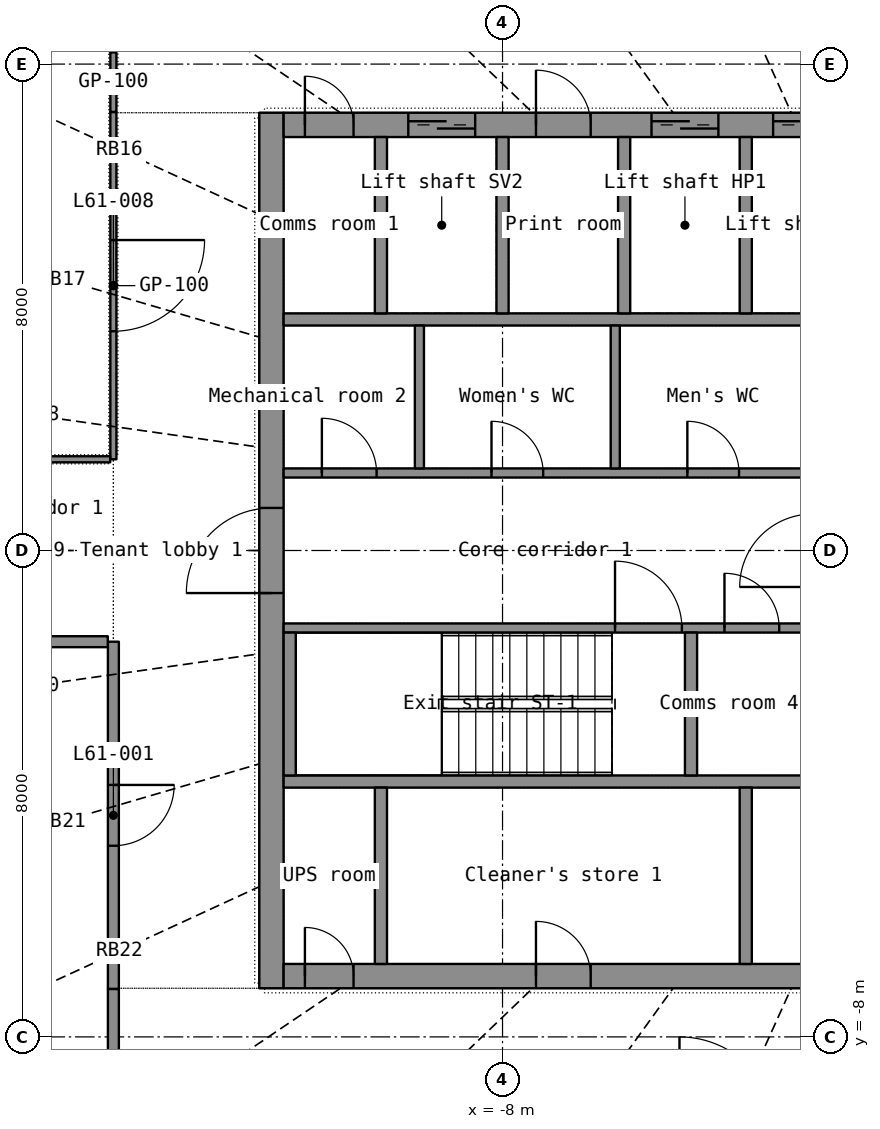
"""IFC4 building model, lengths in metres.
Left out: names, types, materials, properties, quantities, classifications, styles, units other than length and angle.
Written with IfcOpenShell. Run it as: python <this file> out.ifc"""

import sys

from ifc_helpers import new_model, si_unit, direction, frame, frame_2d, origin, place, context, subcontext, project, spatial, rectangle, extrude, element, fill, save


model = new_model("IFC4")
c1 = context("Model", 3, precision=1e-05, world=origin(), true_north=direction((0.0, 1.0)))
c2 = subcontext(c1, "Body", "Model", "MODEL_VIEW")
j1 = project(units=[si_unit("LENGTHUNIT", "METRE"), si_unit("PLANEANGLEUNIT", "RADIAN")], contexts=[c1])
p1 = place(None, origin())
s1 = spatial("IfcSite", under=j1, at=p1, CompositionType="ELEMENT")
p2 = place(p1, origin())
s2 = spatial("IfcBuilding", under=s1, at=p2, CompositionType="ELEMENT")
p3 = place(p2, frame((0.0, 0.0, 250.4)))
s3 = spatial("IfcBuildingStorey", under=s2, at=p3, CompositionType="ELEMENT", Elevation=250.4)
p4 = place(p3, frame((-11.8, -7.2, 0.0), z_axis=(0.0, 0.0, 1.0), x_axis=(0.0, 1.0, 0.0)))
e1 = element("IfcWall", 1, at=p4, inside=s3, PredefinedType="SHEAR", context=c2, shape_type="SweptSolid", body=[
    extrude(rectangle(XDim=14.4, YDim=0.4, at=frame_2d((7.2, 0.0))), origin(), (0.0, 0.0, 1.0), 3.3),
])
p5 = place(p4, frame((6.5, 0.0, 0.0)))
e2 = element("IfcOpeningElement", 2, at=p5, cuts=e1, PredefinedType="OPENING", context=c2, shape_type="SweptSolid", body=[
    extrude(rectangle(XDim=1.4, YDim=2.2, at=frame_2d((0.7, 1.1))), frame((0.0, 0.21, 0.0), z_axis=(0.0, -1.0, 0.0), x_axis=(1.0, 0.0, 0.0)), (0.0, 0.0, 1.0), 0.42),
])
p6 = place(p3, frame((-11.6, -7.0, 0.0), z_axis=(0.0, 0.0, 1.0), x_axis=(1.0, 0.0, 0.0)))
e3 = element("IfcWall", 3, at=p6, inside=s3, PredefinedType="SHEAR", context=c2, shape_type="SweptSolid", body=[
    extrude(rectangle(XDim=23.2, YDim=0.4, at=frame_2d((11.6, 0.0))), origin(), (0.0, 0.0, 1.0), 3.3),
])
p7 = place(p6, frame((20.05, 0.0, 0.0)))
e4 = element("IfcOpeningElement", 4, at=p7, cuts=e3, PredefinedType="OPENING", context=c2, shape_type="SweptSolid", body=[
    extrude(rectangle(XDim=1.1, YDim=2.2, at=frame_2d((0.55, 1.1))), frame((0.0, 0.21, 0.0), z_axis=(0.0, -1.0, 0.0), x_axis=(1.0, 0.0, 0.0)), (0.0, 0.0, 1.0), 0.42),
])
p8 = place(p6, frame((4.15, 0.0, 0.0)))
e5 = element("IfcOpeningElement", 5, at=p8, cuts=e3, PredefinedType="OPENING", context=c2, shape_type="SweptSolid", body=[
    extrude(rectangle(XDim=0.9, YDim=2.1, at=frame_2d((0.45, 1.05))), frame((0.0, 0.21, 0.0), z_axis=(0.0, -1.0, 0.0), x_axis=(1.0, 0.0, 0.0)), (0.0, 0.0, 1.0), 0.42),
])
p9 = place(p6, frame((10.15, 0.0, 0.0)))
e6 = element("IfcOpeningElement", 6, at=p9, cuts=e3, PredefinedType="OPENING", context=c2, shape_type="SweptSolid", body=[
    extrude(rectangle(XDim=0.9, YDim=2.1, at=frame_2d((0.45, 1.05))), frame((0.0, 0.21, 0.0), z_axis=(0.0, -1.0, 0.0), x_axis=(1.0, 0.0, 0.0)), (0.0, 0.0, 1.0), 0.42),
])
p10 = place(p6, frame((16.15, 0.0, 0.0)))
e7 = element("IfcOpeningElement", 7, at=p10, cuts=e3, PredefinedType="OPENING", context=c2, shape_type="SweptSolid", body=[
    extrude(rectangle(XDim=0.9, YDim=2.1, at=frame_2d((0.45, 1.05))), frame((0.0, 0.21, 0.0), z_axis=(0.0, -1.0, 0.0), x_axis=(1.0, 0.0, 0.0)), (0.0, 0.0, 1.0), 0.42),
])
p11 = place(p6, frame((0.35, 0.0, 0.0)))
e8 = element("IfcOpeningElement", 8, at=p11, cuts=e3, PredefinedType="OPENING", context=c2, shape_type="SweptSolid", body=[
    extrude(rectangle(XDim=0.8, YDim=2.05, at=frame_2d((0.4, 1.025))), frame((0.0, 0.21, 0.0), z_axis=(0.0, -1.0, 0.0), x_axis=(1.0, 0.0, 0.0)), (0.0, 0.0, 1.0), 0.42),
])
p12 = place(p6, frame((22.05, 0.0, 0.0)))
e9 = element("IfcOpeningElement", 9, at=p12, cuts=e3, PredefinedType="OPENING", context=c2, shape_type="SweptSolid", body=[
    extrude(rectangle(XDim=0.8, YDim=2.05, at=frame_2d((0.4, 1.025))), frame((0.0, 0.21, 0.0), z_axis=(0.0, -1.0, 0.0), x_axis=(1.0, 0.0, 0.0)), (0.0, 0.0, 1.0), 0.42),
])
p13 = place(p3, frame((-11.6, 7.0, 0.0), z_axis=(0.0, 0.0, 1.0), x_axis=(1.0, 0.0, 0.0)))
e10 = element("IfcWall", 10, at=p13, inside=s3, PredefinedType="SHEAR", context=c2, shape_type="SweptSolid", body=[
    extrude(rectangle(XDim=23.2, YDim=0.4, at=frame_2d((11.6, 0.0))), origin(), (0.0, 0.0, 1.0), 3.3),
])
p14 = place(p13, frame((2.05, 0.0, 0.0)))
e11 = element("IfcOpeningElement", 11, at=p14, cuts=e10, PredefinedType="OPENING", context=c2, shape_type="SweptSolid", body=[
    extrude(rectangle(XDim=1.1, YDim=2.2, at=frame_2d((0.55, 1.1))), frame((0.0, 0.21, 0.0), z_axis=(0.0, -1.0, 0.0), x_axis=(1.0, 0.0, 0.0)), (0.0, 0.0, 1.0), 0.42),
])
p15 = place(p13, frame((6.05, 0.0, 0.0)))
e12 = element("IfcOpeningElement", 12, at=p15, cuts=e10, PredefinedType="OPENING", context=c2, shape_type="SweptSolid", body=[
    extrude(rectangle(XDim=1.1, YDim=2.2, at=frame_2d((0.55, 1.1))), frame((0.0, 0.21, 0.0), z_axis=(0.0, -1.0, 0.0), x_axis=(1.0, 0.0, 0.0)), (0.0, 0.0, 1.0), 0.42),
])
p16 = place(p13, frame((8.05, 0.0, 0.0)))
e13 = element("IfcOpeningElement", 13, at=p16, cuts=e10, PredefinedType="OPENING", context=c2, shape_type="SweptSolid", body=[
    extrude(rectangle(XDim=1.1, YDim=2.2, at=frame_2d((0.55, 1.1))), frame((0.0, 0.21, 0.0), z_axis=(0.0, -1.0, 0.0), x_axis=(1.0, 0.0, 0.0)), (0.0, 0.0, 1.0), 0.42),
])
p17 = place(p13, frame((10.05, 0.0, 0.0)))
e14 = element("IfcOpeningElement", 14, at=p17, cuts=e10, PredefinedType="OPENING", context=c2, shape_type="SweptSolid", body=[
    extrude(rectangle(XDim=1.1, YDim=2.2, at=frame_2d((0.55, 1.1))), frame((0.0, 0.21, 0.0), z_axis=(0.0, -1.0, 0.0), x_axis=(1.0, 0.0, 0.0)), (0.0, 0.0, 1.0), 0.42),
])
p18 = place(p13, frame((12.05, 0.0, 0.0)))
e15 = element("IfcOpeningElement", 15, at=p18, cuts=e10, PredefinedType="OPENING", context=c2, shape_type="SweptSolid", body=[
    extrude(rectangle(XDim=1.1, YDim=2.2, at=frame_2d((0.55, 1.1))), frame((0.0, 0.21, 0.0), z_axis=(0.0, -1.0, 0.0), x_axis=(1.0, 0.0, 0.0)), (0.0, 0.0, 1.0), 0.42),
])
p19 = place(p13, frame((14.05, 0.0, 0.0)))
e16 = element("IfcOpeningElement", 16, at=p19, cuts=e10, PredefinedType="OPENING", context=c2, shape_type="SweptSolid", body=[
    extrude(rectangle(XDim=1.1, YDim=2.2, at=frame_2d((0.55, 1.1))), frame((0.0, 0.21, 0.0), z_axis=(0.0, -1.0, 0.0), x_axis=(1.0, 0.0, 0.0)), (0.0, 0.0, 1.0), 0.42),
])
p20 = place(p13, frame((16.05, 0.0, 0.0)))
e17 = element("IfcOpeningElement", 17, at=p20, cuts=e10, PredefinedType="OPENING", context=c2, shape_type="SweptSolid", body=[
    extrude(rectangle(XDim=1.1, YDim=2.2, at=frame_2d((0.55, 1.1))), frame((0.0, 0.21, 0.0), z_axis=(0.0, -1.0, 0.0), x_axis=(1.0, 0.0, 0.0)), (0.0, 0.0, 1.0), 0.42),
])
p21 = place(p13, frame((18.05, 0.0, 0.0)))
e18 = element("IfcOpeningElement", 18, at=p21, cuts=e10, PredefinedType="OPENING", context=c2, shape_type="SweptSolid", body=[
    extrude(rectangle(XDim=1.1, YDim=2.2, at=frame_2d((0.55, 1.1))), frame((0.0, 0.21, 0.0), z_axis=(0.0, -1.0, 0.0), x_axis=(1.0, 0.0, 0.0)), (0.0, 0.0, 1.0), 0.42),
])
p22 = place(p13, frame((20.05, 0.0, 0.0)))
e19 = element("IfcOpeningElement", 19, at=p22, cuts=e10, PredefinedType="OPENING", context=c2, shape_type="SweptSolid", body=[
    extrude(rectangle(XDim=1.1, YDim=2.2, at=frame_2d((0.55, 1.1))), frame((0.0, 0.21, 0.0), z_axis=(0.0, -1.0, 0.0), x_axis=(1.0, 0.0, 0.0)), (0.0, 0.0, 1.0), 0.42),
])
p23 = place(p13, frame((4.15, 0.0, 0.0)))
e20 = element("IfcOpeningElement", 20, at=p23, cuts=e10, PredefinedType="OPENING", context=c2, shape_type="SweptSolid", body=[
    extrude(rectangle(XDim=0.9, YDim=2.1, at=frame_2d((0.45, 1.05))), frame((0.0, 0.21, 0.0), z_axis=(0.0, -1.0, 0.0), x_axis=(1.0, 0.0, 0.0)), (0.0, 0.0, 1.0), 0.42),
])
p24 = place(p13, frame((0.35, 0.0, 0.0)))
e21 = element("IfcOpeningElement", 21, at=p24, cuts=e10, PredefinedType="OPENING", context=c2, shape_type="SweptSolid", body=[
    extrude(rectangle(XDim=0.8, YDim=2.05, at=frame_2d((0.4, 1.025))), frame((0.0, 0.21, 0.0), z_axis=(0.0, -1.0, 0.0), x_axis=(1.0, 0.0, 0.0)), (0.0, 0.0, 1.0), 0.42),
])
p25 = place(p13, frame((22.05, 0.0, 0.0)))
e22 = element("IfcOpeningElement", 22, at=p25, cuts=e10, PredefinedType="OPENING", context=c2, shape_type="SweptSolid", body=[
    extrude(rectangle(XDim=0.8, YDim=2.05, at=frame_2d((0.4, 1.025))), frame((0.0, 0.21, 0.0), z_axis=(0.0, -1.0, 0.0), x_axis=(1.0, 0.0, 0.0)), (0.0, 0.0, 1.0), 0.42),
])
for number, where, z_axis, x_axis in (
    (23, (-11.6, -3.8, 0.0), (0.0, 0.0, 1.0), (1.0, 0.0, 0.0)),
    (24, (-11.6, 3.8, 0.0), (0.0, 0.0, 1.0), (1.0, 0.0, 0.0)),
):
    element("IfcWall", number, at=place(p3, frame(where, z_axis=z_axis, x_axis=x_axis)), inside=s3, PredefinedType="SHEAR", context=c2, shape_type="SweptSolid", body=[
        extrude(rectangle(XDim=23.2, YDim=0.2, at=frame_2d((11.6, 0.0))), origin(), (0.0, 0.0, 1.0), 3.3),
    ])
p26 = place(p3, frame((-10.0, -6.8, 0.0), z_axis=(0.0, 0.0, 1.0), x_axis=(0.0, 1.0, 0.0)))
e25 = element("IfcWall", 25, at=p26, inside=s3, PredefinedType="SHEAR", context=c2, shape_type="SweptSolid", body=[
    extrude(rectangle(XDim=2.9, YDim=0.2, at=frame_2d((1.45, 0.0))), origin(), (0.0, 0.0, 1.0), 3.3),
])
p27 = place(p3, frame((-4.0, -6.8, 0.0), z_axis=(0.0, 0.0, 1.0), x_axis=(0.0, 1.0, 0.0)))
e26 = element("IfcWall", 26, at=p27, inside=s3, PredefinedType="PARTITIONING", context=c2, shape_type="SweptSolid", body=[
    extrude(rectangle(XDim=2.9, YDim=0.2, at=frame_2d((1.45, 0.0))), origin(), (0.0, 0.0, 1.0), 3.3),
])
for number, where, z_axis, x_axis in (
    (27, (-10.0, 3.9, 0.0), (0.0, 0.0, 1.0), (0.0, 1.0, 0.0)),
    (28, (-8.0, 3.9, 0.0), (0.0, 0.0, 1.0), (0.0, 1.0, 0.0)),
    (29, (-6.0, 3.9, 0.0), (0.0, 0.0, 1.0), (0.0, 1.0, 0.0)),
    (30, (-4.0, 3.9, 0.0), (0.0, 0.0, 1.0), (0.0, 1.0, 0.0)),
):
    element("IfcWall", number, at=place(p3, frame(where, z_axis=z_axis, x_axis=x_axis)), inside=s3, PredefinedType="SHEAR", context=c2, shape_type="SweptSolid", body=[
        extrude(rectangle(XDim=2.9, YDim=0.2, at=frame_2d((1.45, 0.0))), origin(), (0.0, 0.0, 1.0), 3.3),
    ])
p28 = place(p3, frame((-11.6, -1.275, 0.0), z_axis=(0.0, 0.0, 1.0), x_axis=(1.0, 0.0, 0.0)))
e31 = element("IfcWall", 31, at=p28, inside=s3, PredefinedType="SHEAR", context=c2, shape_type="SweptSolid", body=[
    extrude(rectangle(XDim=8.6, YDim=0.15, at=frame_2d((4.3, 0.0))), origin(), (0.0, 0.0, 1.0), 3.3),
])
p29 = place(p28, frame((5.45, 0.0, 0.0)))
e32 = element("IfcOpeningElement", 32, at=p29, cuts=e31, PredefinedType="OPENING", context=c2, shape_type="SweptSolid", body=[
    extrude(rectangle(XDim=1.1, YDim=2.15, at=frame_2d((0.55, 1.075))), frame((0.0, 0.085, 0.0), z_axis=(0.0, -1.0, 0.0), x_axis=(1.0, 0.0, 0.0)), (0.0, 0.0, 1.0), 0.17),
])
p30 = place(p28, frame((7.25, 0.0, 0.0)))
e33 = element("IfcOpeningElement", 33, at=p30, cuts=e31, PredefinedType="OPENING", context=c2, shape_type="SweptSolid", body=[
    extrude(rectangle(XDim=0.9, YDim=2.1, at=frame_2d((0.45, 1.05))), frame((0.0, 0.085, 0.0), z_axis=(0.0, -1.0, 0.0), x_axis=(1.0, 0.0, 0.0)), (0.0, 0.0, 1.0), 0.17),
])
p31 = place(p3, frame((-11.6, 1.275, 0.0), z_axis=(0.0, 0.0, 1.0), x_axis=(1.0, 0.0, 0.0)))
e34 = element("IfcWall", 34, at=p31, inside=s3, PredefinedType="PARTITIONING", context=c2, shape_type="SweptSolid", body=[
    extrude(rectangle(XDim=8.6, YDim=0.15, at=frame_2d((4.3, 0.0))), origin(), (0.0, 0.0, 1.0), 3.3),
])
p32 = place(p31, frame((0.629, 0.0, 0.0)))
e35 = element("IfcOpeningElement", 35, at=p32, cuts=e34, PredefinedType="OPENING", context=c2, shape_type="SweptSolid", body=[
    extrude(rectangle(XDim=0.9, YDim=2.1, at=frame_2d((0.45, 1.05))), frame((0.0, 0.085, 0.0), z_axis=(0.0, -1.0, 0.0), x_axis=(1.0, 0.0, 0.0)), (0.0, 0.0, 1.0), 0.17),
])
p33 = place(p31, frame((3.418, 0.0, 0.0)))
e36 = element("IfcOpeningElement", 36, at=p33, cuts=e34, PredefinedType="OPENING", context=c2, shape_type="SweptSolid", body=[
    extrude(rectangle(XDim=0.85, YDim=2.1, at=frame_2d((0.425, 1.05))), frame((0.0, 0.085, 0.0), z_axis=(0.0, -1.0, 0.0), x_axis=(1.0, 0.0, 0.0)), (0.0, 0.0, 1.0), 0.17),
])
p34 = place(p31, frame((6.639, 0.0, 0.0)))
e37 = element("IfcOpeningElement", 37, at=p34, cuts=e34, PredefinedType="OPENING", context=c2, shape_type="SweptSolid", body=[
    extrude(rectangle(XDim=0.85, YDim=2.1, at=frame_2d((0.425, 1.05))), frame((0.0, 0.085, 0.0), z_axis=(0.0, -1.0, 0.0), x_axis=(1.0, 0.0, 0.0)), (0.0, 0.0, 1.0), 0.17),
])
for number, where, z_axis, x_axis in (
    (38, (-11.5, -3.7, 0.0), (0.0, 0.0, 1.0), (0.0, 1.0, 0.0)),
    (39, (-4.9, -3.7, 0.0), (0.0, 0.0, 1.0), (0.0, 1.0, 0.0)),
):
    element("IfcWall", number, at=place(p3, frame(where, z_axis=z_axis, x_axis=x_axis)), inside=s3, PredefinedType="SHEAR", context=c2, shape_type="SweptSolid", body=[
        extrude(rectangle(XDim=2.35, YDim=0.2, at=frame_2d((1.175, 0.0))), origin(), (0.0, 0.0, 1.0), 3.3),
    ])
for number, where, z_axis, x_axis in (
    (40, (-9.367, 1.35, 0.0), (0.0, 0.0, 1.0), (0.0, 1.0, 0.0)),
    (41, (-6.146, 1.35, 0.0), (0.0, 0.0, 1.0), (0.0, 1.0, 0.0)),
):
    element("IfcWall", number, at=place(p3, frame(where, z_axis=z_axis, x_axis=x_axis)), inside=s3, PredefinedType="PARTITIONING", context=c2, shape_type="SweptSolid", body=[
        extrude(rectangle(XDim=2.35, YDim=0.15, at=frame_2d((1.175, 0.0))), origin(), (0.0, 0.0, 1.0), 3.3),
    ])
p35 = place(p3, frame((-14.4, -1.5, 0.0), z_axis=(0.0, 0.0, 1.0), x_axis=(0.0, -1.0, 0.0)))
e42 = element("IfcWall", 42, at=p35, inside=s3, PredefinedType="PARTITIONING", context=c2, shape_type="SweptSolid", body=[
    extrude(rectangle(XDim=5.712, YDim=0.18, at=frame_2d((2.856, 0.0))), origin(), (0.0, 0.0, 1.0), 2.4),
])
p36 = place(p35, frame((2.356, 0.0, 0.0)))
e43 = element("IfcOpeningElement", 43, at=p36, cuts=e42, PredefinedType="OPENING", context=c2, shape_type="SweptSolid", body=[
    extrude(rectangle(XDim=1.0, YDim=2.1, at=frame_2d((0.5, 1.05))), frame((0.0, 0.1, 0.0), z_axis=(0.0, -1.0, 0.0), x_axis=(1.0, 0.0, 0.0)), (0.0, 0.0, 1.0), 0.2),
])
p37 = place(p3, frame((-14.4, 7.212, 0.0), z_axis=(0.0, 0.0, 1.0), x_axis=(0.0, -1.0, 0.0)))
e44 = element("IfcWall", 44, at=p37, inside=s3, PredefinedType="PARTITIONING", context=c2, shape_type="SweptSolid", body=[
    extrude(rectangle(XDim=5.712, YDim=0.1, at=frame_2d((2.856, 0.0))), origin(), (0.0, 0.0, 1.0), 2.4),
])
p38 = place(p37, frame((2.106, 0.0, 0.0)))
e45 = element("IfcOpeningElement", 45, at=p38, cuts=e44, PredefinedType="OPENING", context=c2, shape_type="SweptSolid", body=[
    extrude(rectangle(XDim=1.5, YDim=2.4, at=frame_2d((0.75, 1.2))), frame((0.0, 0.06, 0.0), z_axis=(0.0, -1.0, 0.0), x_axis=(1.0, 0.0, 0.0)), (0.0, 0.0, 1.0), 0.12),
])
p39 = place(p3, frame((-17.948, -1.5, 0.0), z_axis=(0.0, 0.0, 1.0), x_axis=(1.0, 0.0, 0.0)))
e46 = element("IfcWall", 46, at=p39, inside=s3, PredefinedType="PARTITIONING", context=c2, shape_type="SweptSolid", body=[
    extrude(rectangle(XDim=3.456, YDim=0.18, at=frame_2d((1.728, 0.0))), origin(), (0.0, 0.0, 1.0), 2.4),
])
p40 = place(p3, frame((-14.452, 1.5, 0.0), z_axis=(0.0, 0.0, 1.0), x_axis=(-1.0, 0.0, 0.0)))
e47 = element("IfcWall", 47, at=p40, inside=s3, PredefinedType="PARTITIONING", context=c2, shape_type="SweptSolid", body=[
    extrude(rectangle(XDim=3.496, YDim=0.1, at=frame_2d((1.748, 0.0))), origin(), (0.0, 0.0, 1.0), 2.4),
])
p41 = place(p3, frame((-16.838, 9.657, 0.0), z_axis=(0.0, 0.0, 1.0), x_axis=(0.86742946, -0.497560179, 0.0)))
e48 = element("IfcWall", 48, at=p41, inside=s3, PredefinedType="PARTITIONING", context=c2, shape_type="SweptSolid", body=[
    extrude(rectangle(XDim=2.811, YDim=0.15, at=frame_2d((1.405, 0.0))), origin(), (0.0, 0.0, 1.0), 2.4),
])
p42 = place(p3, frame((-14.4, -7.213, 0.0), z_axis=(0.0, 0.0, 1.0), x_axis=(0.0, -1.0, 0.0)))
e49 = element("IfcWall", 49, at=p42, inside=s3, PredefinedType="PARTITIONING", context=c2, shape_type="SweptSolid", body=[
    extrude(rectangle(XDim=2.295, YDim=0.18, at=frame_2d((1.147, 0.0))), origin(), (0.0, 0.0, 1.0), 2.4),
])
p43 = place(p3, frame((-14.4, 8.192, 0.0), z_axis=(0.0, 0.0, 1.0), x_axis=(0.0, -1.0, 0.0)))
e50 = element("IfcWall", 50, at=p43, inside=s3, PredefinedType="PARTITIONING", context=c2, shape_type="SweptSolid", body=[
    extrude(rectangle(XDim=0.979, YDim=0.1, at=frame_2d((0.49, 0.0))), origin(), (0.0, 0.0, 1.0), 2.4),
])
p44 = place(p8, origin())
e51 = element("IfcDoor", 51, at=p44, inside=s3, OperationType="SINGLE_SWING_LEFT", PredefinedType="DOOR", context=c2, shape_type="SweptSolid", body=[
    extrude(rectangle(XDim=0.9, YDim=2.1, at=frame_2d((0.45, 1.05))), frame((0.0, 0.025, 0.0), z_axis=(0.0, -1.0, 0.0), x_axis=(1.0, 0.0, 0.0)), (0.0, 0.0, 1.0), 0.05),
])
fill(e5, e51)
p45 = place(p11, origin())
e52 = element("IfcDoor", 52, at=p45, inside=s3, OperationType="SINGLE_SWING_LEFT", PredefinedType="DOOR", context=c2, shape_type="SweptSolid", body=[
    extrude(rectangle(XDim=0.8, YDim=2.05, at=frame_2d((0.4, 1.025))), frame((0.0, 0.025, 0.0), z_axis=(0.0, -1.0, 0.0), x_axis=(1.0, 0.0, 0.0)), (0.0, 0.0, 1.0), 0.05),
])
fill(e8, e52)
p46 = place(p14, origin())
e53 = element("IfcDoor", 53, at=p46, inside=s3, OperationType="DOUBLE_DOOR_SLIDING", PredefinedType="DOOR", context=c2, shape_type="SweptSolid", body=[
    extrude(rectangle(XDim=1.1, YDim=2.2, at=frame_2d((0.55, 1.1))), frame((0.0, 0.025, 0.0), z_axis=(0.0, -1.0, 0.0), x_axis=(1.0, 0.0, 0.0)), (0.0, 0.0, 1.0), 0.05),
])
fill(e11, e53)
p47 = place(p15, origin())
e54 = element("IfcDoor", 54, at=p47, inside=s3, OperationType="DOUBLE_DOOR_SLIDING", PredefinedType="DOOR", context=c2, shape_type="SweptSolid", body=[
    extrude(rectangle(XDim=1.1, YDim=2.2, at=frame_2d((0.55, 1.1))), frame((0.0, 0.025, 0.0), z_axis=(0.0, -1.0, 0.0), x_axis=(1.0, 0.0, 0.0)), (0.0, 0.0, 1.0), 0.05),
])
fill(e12, e54)
p48 = place(p16, origin())
e55 = element("IfcDoor", 55, at=p48, inside=s3, OperationType="DOUBLE_DOOR_SLIDING", PredefinedType="DOOR", context=c2, shape_type="SweptSolid", body=[
    extrude(rectangle(XDim=1.1, YDim=2.2, at=frame_2d((0.55, 1.1))), frame((0.0, 0.025, 0.0), z_axis=(0.0, -1.0, 0.0), x_axis=(1.0, 0.0, 0.0)), (0.0, 0.0, 1.0), 0.05),
])
fill(e13, e55)
p49 = place(p23, origin())
e56 = element("IfcDoor", 56, at=p49, inside=s3, OperationType="SINGLE_SWING_LEFT", PredefinedType="DOOR", context=c2, shape_type="SweptSolid", body=[
    extrude(rectangle(XDim=0.9, YDim=2.1, at=frame_2d((0.45, 1.05))), frame((0.0, 0.025, 0.0), z_axis=(0.0, -1.0, 0.0), x_axis=(1.0, 0.0, 0.0)), (0.0, 0.0, 1.0), 0.05),
])
fill(e20, e56)
p50 = place(p24, origin())
e57 = element("IfcDoor", 57, at=p50, inside=s3, OperationType="SINGLE_SWING_LEFT", PredefinedType="DOOR", context=c2, shape_type="SweptSolid", body=[
    extrude(rectangle(XDim=0.8, YDim=2.05, at=frame_2d((0.4, 1.025))), frame((0.0, 0.025, 0.0), z_axis=(0.0, -1.0, 0.0), x_axis=(1.0, 0.0, 0.0)), (0.0, 0.0, 1.0), 0.05),
])
fill(e21, e57)
p51 = place(p5, origin())
e58 = element("IfcDoor", 58, at=p51, inside=s3, OperationType="DOUBLE_DOOR_SINGLE_SWING", PredefinedType="DOOR", context=c2, shape_type="SweptSolid", body=[
    extrude(rectangle(XDim=1.4, YDim=2.2, at=frame_2d((0.7, 1.1))), frame((0.0, 0.025, 0.0), z_axis=(0.0, -1.0, 0.0), x_axis=(1.0, 0.0, 0.0)), (0.0, 0.0, 1.0), 0.05),
])
fill(e2, e58)
p52 = place(p29, origin())
e59 = element("IfcDoor", 59, at=p52, inside=s3, OperationType="SINGLE_SWING_LEFT", PredefinedType="DOOR", context=c2, shape_type="SweptSolid", body=[
    extrude(rectangle(XDim=1.1, YDim=2.15, at=frame_2d((0.55, 1.075))), frame((0.0, 0.025, 0.0), z_axis=(0.0, -1.0, 0.0), x_axis=(1.0, 0.0, 0.0)), (0.0, 0.0, 1.0), 0.05),
])
fill(e32, e59)
p53 = place(p32, origin())
e60 = element("IfcDoor", 60, at=p53, inside=s3, OperationType="SINGLE_SWING_LEFT", PredefinedType="DOOR", context=c2, shape_type="SweptSolid", body=[
    extrude(rectangle(XDim=0.9, YDim=2.1, at=frame_2d((0.45, 1.05))), frame((0.0, 0.025, 0.0), z_axis=(0.0, -1.0, 0.0), x_axis=(1.0, 0.0, 0.0)), (0.0, 0.0, 1.0), 0.05),
])
fill(e35, e60)
p54 = place(p33, origin())
e61 = element("IfcDoor", 61, at=p54, inside=s3, OperationType="SINGLE_SWING_LEFT", PredefinedType="DOOR", context=c2, shape_type="SweptSolid", body=[
    extrude(rectangle(XDim=0.85, YDim=2.1, at=frame_2d((0.425, 1.05))), frame((0.0, 0.025, 0.0), z_axis=(0.0, -1.0, 0.0), x_axis=(1.0, 0.0, 0.0)), (0.0, 0.0, 1.0), 0.05),
])
fill(e36, e61)
p55 = place(p34, origin())
e62 = element("IfcDoor", 62, at=p55, inside=s3, OperationType="SINGLE_SWING_LEFT", PredefinedType="DOOR", context=c2, shape_type="SweptSolid", body=[
    extrude(rectangle(XDim=0.85, YDim=2.1, at=frame_2d((0.425, 1.05))), frame((0.0, 0.025, 0.0), z_axis=(0.0, -1.0, 0.0), x_axis=(1.0, 0.0, 0.0)), (0.0, 0.0, 1.0), 0.05),
])
fill(e37, e62)
p56 = place(p30, origin())
e63 = element("IfcDoor", 63, at=p56, inside=s3, OperationType="SINGLE_SWING_LEFT", PredefinedType="DOOR", context=c2, shape_type="SweptSolid", body=[
    extrude(rectangle(XDim=0.9, YDim=2.1, at=frame_2d((0.45, 1.05))), frame((0.0, 0.025, 0.0), z_axis=(0.0, -1.0, 0.0), x_axis=(1.0, 0.0, 0.0)), (0.0, 0.0, 1.0), 0.05),
])
fill(e33, e63)
p57 = place(p36, origin())
e64 = element("IfcDoor", 64, at=p57, inside=s3, OperationType="SINGLE_SWING_LEFT", PredefinedType="DOOR", context=c2, shape_type="SweptSolid", body=[
    extrude(rectangle(XDim=1.0, YDim=2.1, at=frame_2d((0.5, 1.05))), frame((0.0, 0.025, 0.0), z_axis=(0.0, -1.0, 0.0), x_axis=(1.0, 0.0, 0.0)), (0.0, 0.0, 1.0), 0.05),
])
fill(e43, e64)
p58 = place(p38, origin())
e65 = element("IfcDoor", 65, at=p58, inside=s3, OperationType="DOUBLE_DOOR_SINGLE_SWING", PredefinedType="DOOR", context=c2, shape_type="SweptSolid", body=[
    extrude(rectangle(XDim=1.5, YDim=2.4, at=frame_2d((0.75, 1.2))), frame((0.0, 0.025, 0.0), z_axis=(0.0, -1.0, 0.0), x_axis=(1.0, 0.0, 0.0)), (0.0, 0.0, 1.0), 0.05),
])
fill(e45, e65)
save(model, sys.argv[1])
